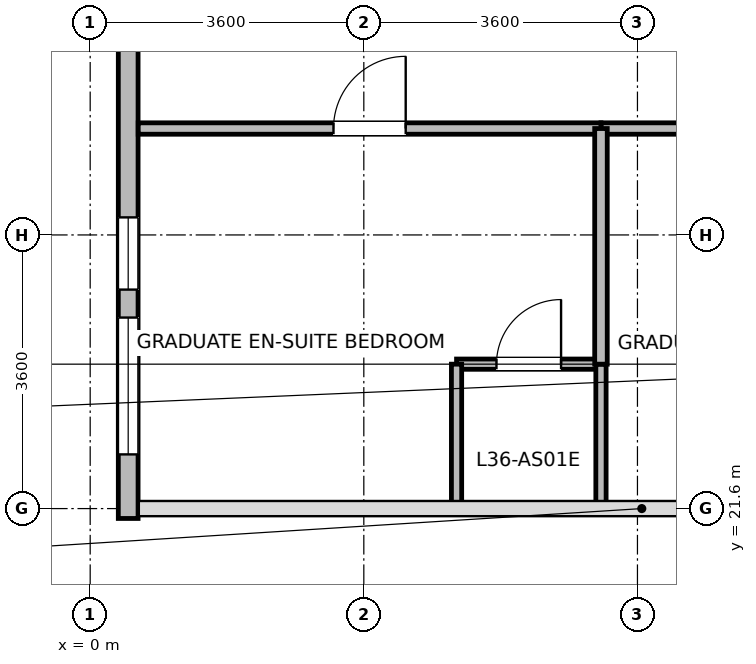
"""IFC4 building model, lengths in metres.
Left out: names, types, materials, properties, quantities, classifications, styles, units other than length and angle.
Written with IfcOpenShell. Run it as: python <this file> out.ifc"""

import sys

from ifc_helpers import new_model, si_unit, direction, frame, frame_2d, origin, place, context, subcontext, project, spatial, rectangle, extrude, element, fill, save


model = new_model("IFC4")
c1 = context("Model", 3, precision=1e-05, world=origin(), true_north=direction((0.0, 1.0)))
c2 = subcontext(c1, "Body", "Model", "MODEL_VIEW")
j1 = project(units=[si_unit("LENGTHUNIT", "METRE"), si_unit("PLANEANGLEUNIT", "RADIAN")], contexts=[c1])
p1 = place(None, origin())
s1 = spatial("IfcSite", under=j1, at=p1, CompositionType="ELEMENT")
p2 = place(p1, origin())
s2 = spatial("IfcBuilding", under=s1, at=p2, CompositionType="ELEMENT")
p3 = place(p2, frame((0.0, 0.0, 143.9)))
s3 = spatial("IfcBuildingStorey", under=s2, at=p3, CompositionType="ELEMENT", Elevation=143.9)
p4 = place(p3, frame((0.5, 21.47, 0.0), z_axis=(0.0, 0.0, 1.0), x_axis=(0.0, 1.0, 0.0)))
e1 = element("IfcWall", 1, at=p4, inside=s3, PredefinedType="STANDARD", context=c2, shape_type="SweptSolid", body=[
    extrude(rectangle(XDim=6.972, YDim=0.26, at=frame_2d((3.486, 0.0))), origin(), (0.0, 0.0, 1.0), 3.44),
])
p5 = place(p4, frame((0.843, 0.0, 0.85)))
e2 = element("IfcOpeningElement", 2, at=p5, cuts=e1, PredefinedType="OPENING", context=c2, shape_type="SweptSolid", body=[
    extrude(rectangle(XDim=1.8, YDim=1.85, at=frame_2d((0.9, 0.925))), frame((0.0, 0.14, 0.0), z_axis=(0.0, -1.0, 0.0), x_axis=(1.0, 0.0, 0.0)), (0.0, 0.0, 1.0), 0.28),
])
p6 = place(p4, frame((3.011, 0.0, 0.85)))
e3 = element("IfcOpeningElement", 3, at=p6, cuts=e1, PredefinedType="OPENING", context=c2, shape_type="SweptSolid", body=[
    extrude(rectangle(XDim=0.95, YDim=1.75, at=frame_2d((0.475, 0.875))), frame((0.0, 0.14, 0.0), z_axis=(0.0, -1.0, 0.0), x_axis=(1.0, 0.0, 0.0)), (0.0, 0.0, 1.0), 0.28),
])
p7 = place(p3, frame((4.82, 23.5, 0.0), z_axis=(0.0, 0.0, 1.0), x_axis=(1.0, 0.0, 0.0)))
e4 = element("IfcWall", 4, at=p7, inside=s3, PredefinedType="PARTITIONING", context=c2, shape_type="SweptSolid", body=[
    extrude(rectangle(XDim=1.9, YDim=0.135, at=frame_2d((0.95, 0.0))), origin(), (0.0, 0.0, 1.0), 3.44),
])
p8 = place(p7, frame((0.525, 0.0, 0.0)))
e5 = element("IfcOpeningElement", 5, at=p8, cuts=e4, PredefinedType="OPENING", context=c2, shape_type="SweptSolid", body=[
    extrude(rectangle(XDim=0.85, YDim=2.04, at=frame_2d((0.425, 1.02))), frame((0.0, 0.078, 0.0), z_axis=(0.0, -1.0, 0.0), x_axis=(1.0, 0.0, 0.0)), (0.0, 0.0, 1.0), 0.155),
])
for number, where, z_axis, x_axis in (
    (6, (4.82, 21.62, 0.0), (0.0, 0.0, 1.0), (0.0, 1.0, 0.0)),
    (7, (6.72, 21.62, 0.0), (0.0, 0.0, 1.0), (0.0, 1.0, 0.0)),
):
    element("IfcWall", number, at=place(p3, frame(where, z_axis=z_axis, x_axis=x_axis)), inside=s3, PredefinedType="PARTITIONING", context=c2, shape_type="SweptSolid", body=[
        extrude(rectangle(XDim=1.88, YDim=0.135, at=frame_2d((0.94, 0.0))), origin(), (0.0, 0.0, 1.0), 3.44),
    ])
p9 = place(p3, frame((6.72, 26.6, 0.0), z_axis=(0.0, 0.0, 1.0), x_axis=(1.0, 0.0, 0.0)))
e8 = element("IfcWall", 8, at=p9, inside=s3, PredefinedType="PARTITIONING", context=c2, shape_type="SweptSolid", body=[
    extrude(rectangle(XDim=6.54, YDim=0.15, at=frame_2d((3.27, 0.0))), origin(), (0.0, 0.0, 1.0), 3.44),
])
p10 = place(p9, frame((2.795, 0.0, 0.0)))
e9 = element("IfcOpeningElement", 9, at=p10, cuts=e8, PredefinedType="OPENING", context=c2, shape_type="SweptSolid", body=[
    extrude(rectangle(XDim=0.95, YDim=2.1, at=frame_2d((0.475, 1.05))), frame((0.0, 0.085, 0.0), z_axis=(0.0, -1.0, 0.0), x_axis=(1.0, 0.0, 0.0)), (0.0, 0.0, 1.0), 0.17),
])
p11 = place(p3, frame((0.632, 26.6, 0.0), z_axis=(0.0, 0.0, 1.0), x_axis=(1.0, 0.0, 0.0)))
e10 = element("IfcWall", 10, at=p11, inside=s3, PredefinedType="PARTITIONING", context=c2, shape_type="SweptSolid", body=[
    extrude(rectangle(XDim=6.088, YDim=0.15, at=frame_2d((3.044, 0.0))), origin(), (0.0, 0.0, 1.0), 3.44),
])
p12 = place(p11, frame((2.569, 0.0, 0.0)))
e11 = element("IfcOpeningElement", 11, at=p12, cuts=e10, PredefinedType="OPENING", context=c2, shape_type="SweptSolid", body=[
    extrude(rectangle(XDim=0.95, YDim=2.1, at=frame_2d((0.475, 1.05))), frame((0.0, 0.085, 0.0), z_axis=(0.0, -1.0, 0.0), x_axis=(1.0, 0.0, 0.0)), (0.0, 0.0, 1.0), 0.17),
])
p13 = place(p3, frame((6.72, 23.5, 0.0), z_axis=(0.0, 0.0, 1.0), x_axis=(0.0, 1.0, 0.0)))
e12 = element("IfcWall", 12, at=p13, inside=s3, PredefinedType="PARTITIONING", context=c2, shape_type="SweptSolid", body=[
    extrude(rectangle(XDim=3.1, YDim=0.165, at=frame_2d((1.55, 0.0))), origin(), (0.0, 0.0, 1.0), 3.44),
])
p14 = place(p5, origin())
e13 = element("IfcWindow", 13, at=p14, inside=s3, PartitioningType="SINGLE_PANEL", PredefinedType="WINDOW", context=c2, shape_type="SweptSolid", body=[
    extrude(rectangle(XDim=1.8, YDim=1.85, at=frame_2d((0.9, 0.925))), frame((0.0, 0.03, 0.0), z_axis=(0.0, -1.0, 0.0), x_axis=(1.0, 0.0, 0.0)), (0.0, 0.0, 1.0), 0.06),
])
fill(e2, e13)
p15 = place(p6, origin())
e14 = element("IfcWindow", 14, at=p15, inside=s3, PartitioningType="SINGLE_PANEL", PredefinedType="WINDOW", context=c2, shape_type="SweptSolid", body=[
    extrude(rectangle(XDim=0.95, YDim=1.75, at=frame_2d((0.475, 0.875))), frame((0.0, 0.03, 0.0), z_axis=(0.0, -1.0, 0.0), x_axis=(1.0, 0.0, 0.0)), (0.0, 0.0, 1.0), 0.06),
])
fill(e3, e14)
p16 = place(p8, origin())
e15 = element("IfcDoor", 15, at=p16, inside=s3, OperationType="SINGLE_SWING_RIGHT", PredefinedType="DOOR", context=c2, shape_type="SweptSolid", body=[
    extrude(rectangle(XDim=0.85, YDim=2.04, at=frame_2d((0.425, 1.02))), frame((0.0, 0.025, 0.0), z_axis=(0.0, -1.0, 0.0), x_axis=(1.0, 0.0, 0.0)), (0.0, 0.0, 1.0), 0.05),
])
fill(e5, e15)
p17 = place(p12, origin())
e16 = element("IfcDoor", 16, at=p17, inside=s3, OperationType="SINGLE_SWING_RIGHT", PredefinedType="DOOR", context=c2, shape_type="SweptSolid", body=[
    extrude(rectangle(XDim=0.95, YDim=2.1, at=frame_2d((0.475, 1.05))), frame((0.0, 0.025, 0.0), z_axis=(0.0, -1.0, 0.0), x_axis=(1.0, 0.0, 0.0)), (0.0, 0.0, 1.0), 0.05),
])
fill(e11, e16)
save(model, sys.argv[1])
